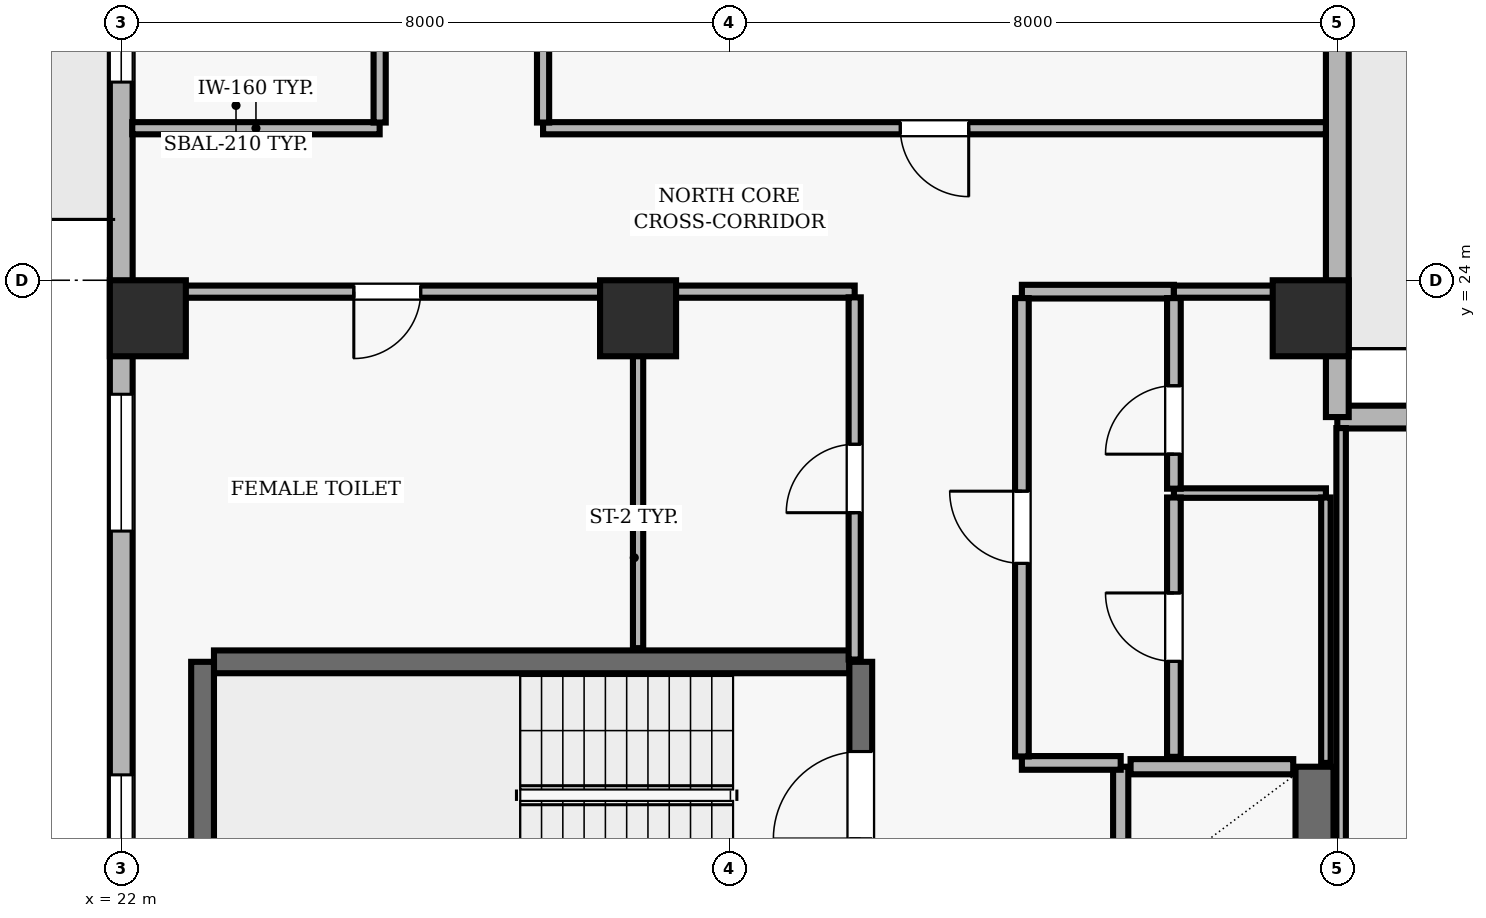
"""IFC4 building model, lengths in metres.
Left out: names, types, materials, properties, quantities, classifications, styles, units other than length and angle.
Written with IfcOpenShell. Run it as: python <this file> out.ifc"""

import sys

from ifc_helpers import new_model, si_unit, direction, frame, frame_2d, origin, origin_2d, place, context, subcontext, project, spatial, rectangle, extrude, element, fill, save


model = new_model("IFC4")
c1 = context("Model", 3, precision=1e-05, world=origin(), true_north=direction((0.0, 1.0)))
c2 = subcontext(c1, "Body", "Model", "MODEL_VIEW")
j1 = project(units=[si_unit("LENGTHUNIT", "METRE"), si_unit("PLANEANGLEUNIT", "RADIAN")], contexts=[c1])
p1 = place(None, origin())
s1 = spatial("IfcSite", under=j1, at=p1, CompositionType="ELEMENT")
p2 = place(p1, origin())
s2 = spatial("IfcBuilding", under=s1, at=p2, CompositionType="ELEMENT")
p3 = place(p2, frame((0.0, 0.0, 234.3)))
s3 = spatial("IfcBuildingStorey", under=s2, at=p3, CompositionType="ELEMENT", Elevation=234.3)
for number, where, z_axis, x_axis in (
    (1, (22.35, 23.5, 0.0), (0.0, 0.0, 1.0), (1.0, 0.0, 0.0)),
    (2, (28.8, 23.5, 0.0), (0.0, 0.0, 1.0), (1.0, 0.0, 0.0)),
    (3, (37.65, 23.5, 0.0), (0.0, 0.0, 1.0), (1.0, 0.0, 0.0)),
):
    element("IfcColumn", number, at=place(p3, frame(where, z_axis=z_axis, x_axis=x_axis)), inside=s3, PredefinedType="COLUMN", context=c2, shape_type="SweptSolid", body=[
        extrude(rectangle(XDim=1.0, YDim=1.0, at=origin_2d()), origin(), (0.0, 0.0, 1.0), 3.9),
    ])
p4 = place(p3, frame((42.4, 22.2, 0.0), z_axis=(0.0, 0.0, 1.0), x_axis=(-1.0, 0.0, 0.0)))
e4 = element("IfcWall", 4, at=p4, inside=s3, PredefinedType="SOLIDWALL", context=c2, shape_type="SweptSolid", body=[
    extrude(rectangle(XDim=4.4, YDim=0.3, at=frame_2d((2.2, 0.0))), origin(), (0.0, 0.0, 1.0), 3.64),
])
p5 = place(p3, frame((38.0, 22.2, 0.0), z_axis=(0.0, 0.0, 1.0), x_axis=(0.0, 1.0, 0.0)))
e5 = element("IfcWall", 5, at=p5, inside=s3, PredefinedType="SOLIDWALL", context=c2, shape_type="SweptSolid", body=[
    extrude(rectangle(XDim=18.5, YDim=0.3, at=frame_2d((9.25, 0.0))), origin(), (0.0, 0.0, 1.0), 3.64),
])
p6 = place(p5, frame((11.05, 0.0, 0.0)))
e6 = element("IfcOpeningElement", 6, at=p6, cuts=e5, PredefinedType="OPENING", context=c2, shape_type="SweptSolid", body=[
    extrude(rectangle(XDim=1.0, YDim=2.2, at=frame_2d((0.5, 1.1))), frame((0.0, 0.16, 0.0), z_axis=(0.0, -1.0, 0.0), x_axis=(1.0, 0.0, 0.0)), (0.0, 0.0, 1.0), 0.32),
])
p7 = place(p3, frame((22.0, 40.7, 0.0), z_axis=(0.0, 0.0, 1.0), x_axis=(0.0, -1.0, 0.0)))
e7 = element("IfcWall", 7, at=p7, inside=s3, PredefinedType="SOLIDWALL", context=c2, shape_type="SweptSolid", body=[
    extrude(rectangle(XDim=38.2, YDim=0.3, at=frame_2d((19.1, 0.0))), origin(), (0.0, 0.0, 1.0), 3.64),
])
p8 = place(p7, frame((6.7, 0.0, 0.0)))
e8 = element("IfcOpeningElement", 8, at=p8, cuts=e7, PredefinedType="OPENING", context=c2, shape_type="SweptSolid", body=[
    extrude(rectangle(XDim=1.0, YDim=2.2, at=frame_2d((0.5, 1.1))), frame((0.0, 0.16, 0.0), z_axis=(0.0, -1.0, 0.0), x_axis=(1.0, 0.0, 0.0)), (0.0, 0.0, 1.0), 0.32),
])
p9 = place(p7, frame((12.293, 0.0, 0.9)))
e9 = element("IfcOpeningElement", 9, at=p9, cuts=e7, PredefinedType="OPENING", context=c2, shape_type="SweptSolid", body=[
    extrude(rectangle(XDim=1.8, YDim=2.2, at=frame_2d((0.9, 1.1))), frame((0.0, 0.16, 0.0), z_axis=(0.0, -1.0, 0.0), x_axis=(1.0, 0.0, 0.0)), (0.0, 0.0, 1.0), 0.32),
])
p10 = place(p7, frame((18.2, 0.0, 0.9)))
e10 = element("IfcOpeningElement", 10, at=p10, cuts=e7, PredefinedType="OPENING", context=c2, shape_type="SweptSolid", body=[
    extrude(rectangle(XDim=1.8, YDim=2.2, at=frame_2d((0.9, 1.1))), frame((0.0, 0.16, 0.0), z_axis=(0.0, -1.0, 0.0), x_axis=(1.0, 0.0, 0.0)), (0.0, 0.0, 1.0), 0.32),
])
p11 = place(p7, frame((23.207, 0.0, 0.9)))
e11 = element("IfcOpeningElement", 11, at=p11, cuts=e7, PredefinedType="OPENING", context=c2, shape_type="SweptSolid", body=[
    extrude(rectangle(XDim=1.8, YDim=2.2, at=frame_2d((0.9, 1.1))), frame((0.0, 0.16, 0.0), z_axis=(0.0, -1.0, 0.0), x_axis=(1.0, 0.0, 0.0)), (0.0, 0.0, 1.0), 0.32),
])
p12 = place(p7, frame((29.114, 0.0, 0.9)))
e12 = element("IfcOpeningElement", 12, at=p12, cuts=e7, PredefinedType="OPENING", context=c2, shape_type="SweptSolid", body=[
    extrude(rectangle(XDim=1.8, YDim=2.2, at=frame_2d((0.9, 1.1))), frame((0.0, 0.16, 0.0), z_axis=(0.0, -1.0, 0.0), x_axis=(1.0, 0.0, 0.0)), (0.0, 0.0, 1.0), 0.32),
])
p13 = place(p3, frame((31.58, 18.98, 0.0), z_axis=(0.0, 0.0, 1.0), x_axis=(-1.0, 0.0, 0.0)))
e13 = element("IfcWall", 13, at=p13, inside=s3, PredefinedType="SHEAR", context=c2, shape_type="SweptSolid", body=[
    extrude(rectangle(XDim=8.36, YDim=0.3, at=frame_2d((4.18, 0.0))), origin(), (0.0, 0.0, 1.0), 3.64),
])
p14 = place(p3, frame((23.07, 18.98, 0.0), z_axis=(0.0, 0.0, 1.0), x_axis=(0.0, -1.0, 0.0)))
e14 = element("IfcWall", 14, at=p14, inside=s3, PredefinedType="SHEAR", context=c2, shape_type="SweptSolid", body=[
    extrude(rectangle(XDim=3.51, YDim=0.3, at=frame_2d((1.755, 0.0))), origin(), (0.0, 0.0, 1.0), 3.64),
])
p15 = place(p3, frame((31.73, 15.47, 0.0), z_axis=(0.0, 0.0, 1.0), x_axis=(0.0, 1.0, 0.0)))
e15 = element("IfcWall", 15, at=p15, inside=s3, PredefinedType="SHEAR", context=c2, shape_type="SweptSolid", body=[
    extrude(rectangle(XDim=3.51, YDim=0.3, at=frame_2d((1.755, 0.0))), origin(), (0.0, 0.0, 1.0), 3.64),
])
p16 = place(p15, frame((1.18, 0.0, 0.0)))
e16 = element("IfcOpeningElement", 16, at=p16, cuts=e15, PredefinedType="OPENING", context=c2, shape_type="SweptSolid", body=[
    extrude(rectangle(XDim=1.15, YDim=2.15, at=frame_2d((0.575, 1.075))), frame((0.0, 0.16, 0.0), z_axis=(0.0, -1.0, 0.0), x_axis=(1.0, 0.0, 0.0)), (0.0, 0.0, 1.0), 0.32),
])
p17 = place(p3, frame((35.15, 17.6, 0.0), z_axis=(0.0, 0.0, 1.0), x_axis=(0.0, -1.0, 0.0)))
e17 = element("IfcWall", 17, at=p17, inside=s3, PredefinedType="SOLIDWALL", context=c2, shape_type="SweptSolid", body=[
    extrude(rectangle(XDim=1.85, YDim=0.2, at=frame_2d((0.925, 0.0))), origin(), (0.0, 0.0, 1.0), 3.64),
])
p18 = place(p3, frame((37.7, 15.75, 0.0), z_axis=(0.0, 0.0, 1.0), x_axis=(0.0, 1.0, 0.0)))
e18 = element("IfcWall", 18, at=p18, inside=s3, PredefinedType="SHEAR", context=c2, shape_type="SweptSolid", body=[
    extrude(rectangle(XDim=1.85, YDim=0.5, at=frame_2d((0.925, 0.0))), origin(), (0.0, 0.0, 1.0), 3.64),
])
p19 = place(p3, frame((37.42, 17.6, 0.0), z_axis=(0.0, 0.0, 1.0), x_axis=(-1.0, 0.0, 0.0)))
e19 = element("IfcWall", 19, at=p19, inside=s3, PredefinedType="SOLIDWALL", context=c2, shape_type="SweptSolid", body=[
    extrude(rectangle(XDim=2.14, YDim=0.2, at=frame_2d((1.07, 0.0))), origin(), (0.0, 0.0, 1.0), 3.64),
])
p20 = place(p3, frame((25.4, 26.0, 0.0), z_axis=(0.0, 0.0, 1.0), x_axis=(-1.0, 0.0, 0.0)))
e20 = element("IfcWall", 20, at=p20, inside=s3, PredefinedType="PARTITIONING", context=c2, shape_type="SweptSolid", body=[
    extrude(rectangle(XDim=3.255, YDim=0.16, at=frame_2d((1.627, 0.0))), origin(), (0.0, 0.0, 1.0), 3.64),
])
p21 = place(p3, frame((28.8, 23.85, 0.0), z_axis=(0.0, 0.0, 1.0), x_axis=(-1.0, 0.0, 0.0)))
e21 = element("IfcWall", 21, at=p21, inside=s3, PredefinedType="PARTITIONING", context=c2, shape_type="SweptSolid", body=[
    extrude(rectangle(XDim=6.6, YDim=0.16, at=frame_2d((3.3, 0.0))), origin(), (0.0, 0.0, 1.0), 3.096),
])
p22 = place(p21, frame((2.86, 0.0, 0.0)))
e22 = element("IfcOpeningElement", 22, at=p22, cuts=e21, PredefinedType="OPENING", context=c2, shape_type="SweptSolid", body=[
    extrude(rectangle(XDim=0.88, YDim=2.1, at=frame_2d((0.44, 1.05))), frame((0.0, 0.09, 0.0), z_axis=(0.0, -1.0, 0.0), x_axis=(1.0, 0.0, 0.0)), (0.0, 0.0, 1.0), 0.18),
])
p23 = place(p3, frame((31.65, 23.85, 0.0), z_axis=(0.0, 0.0, 1.0), x_axis=(-1.0, 0.0, 0.0)))
e23 = element("IfcWall", 23, at=p23, inside=s3, PredefinedType="PARTITIONING", context=c2, shape_type="SweptSolid", body=[
    extrude(rectangle(XDim=2.85, YDim=0.16, at=frame_2d((1.425, 0.0))), origin(), (0.0, 0.0, 1.0), 3.096),
])
p24 = place(p3, frame((33.85, 17.65, 0.0), z_axis=(0.0, 0.0, 1.0), x_axis=(1.0, 0.0, 0.0)))
e24 = element("IfcWall", 24, at=p24, inside=s3, PredefinedType="PARTITIONING", context=c2, shape_type="SweptSolid", body=[
    extrude(rectangle(XDim=1.3, YDim=0.18, at=frame_2d((0.65, 0.0))), origin(), (0.0, 0.0, 1.0), 3.64),
])
p25 = place(p3, frame((35.85, 21.2, 0.0), z_axis=(0.0, 0.0, 1.0), x_axis=(1.0, 0.0, 0.0)))
e25 = element("IfcWall", 25, at=p25, inside=s3, PredefinedType="PARTITIONING", context=c2, shape_type="SweptSolid", body=[
    extrude(rectangle(XDim=2.0, YDim=0.125, at=frame_2d((1.0, 0.0))), origin(), (0.0, 0.0, 1.0), 3.64),
])
p26 = place(p3, frame((35.85, 23.85, 0.0), z_axis=(0.0, 0.0, 1.0), x_axis=(-1.0, 0.0, 0.0)))
e26 = element("IfcWall", 26, at=p26, inside=s3, PredefinedType="PARTITIONING", context=c2, shape_type="SweptSolid", body=[
    extrude(rectangle(XDim=2.0, YDim=0.18, at=frame_2d((1.0, 0.0))), origin(), (0.0, 0.0, 1.0), 3.096),
])
p27 = place(p3, frame((37.85, 23.85, 0.0), z_axis=(0.0, 0.0, 1.0), x_axis=(-1.0, 0.0, 0.0)))
e27 = element("IfcWall", 27, at=p27, inside=s3, PredefinedType="PARTITIONING", context=c2, shape_type="SweptSolid", body=[
    extrude(rectangle(XDim=2.0, YDim=0.16, at=frame_2d((1.0, 0.0))), origin(), (0.0, 0.0, 1.0), 3.096),
])
p28 = place(p3, frame((37.85, 26.0, 0.0), z_axis=(0.0, 0.0, 1.0), x_axis=(-1.0, 0.0, 0.0)))
e28 = element("IfcWall", 28, at=p28, inside=s3, PredefinedType="PARTITIONING", context=c2, shape_type="SweptSolid", body=[
    extrude(rectangle(XDim=10.3, YDim=0.16, at=frame_2d((5.15, 0.0))), origin(), (0.0, 0.0, 1.0), 3.64),
])
p29 = place(p28, frame((4.7, 0.0, 0.0)))
e29 = element("IfcOpeningElement", 29, at=p29, cuts=e28, PredefinedType="OPENING", context=c2, shape_type="SweptSolid", body=[
    extrude(rectangle(XDim=0.9, YDim=2.1, at=frame_2d((0.45, 1.05))), frame((0.0, 0.09, 0.0), z_axis=(0.0, -1.0, 0.0), x_axis=(1.0, 0.0, 0.0)), (0.0, 0.0, 1.0), 0.18),
])
p30 = place(p3, frame((25.4, 31.622, 0.0), z_axis=(0.0, 0.0, 1.0), x_axis=(0.0, -1.0, 0.0)))
e30 = element("IfcWall", 30, at=p30, inside=s3, PredefinedType="PARTITIONING", context=c2, shape_type="SweptSolid", body=[
    extrude(rectangle(XDim=5.547, YDim=0.16, at=frame_2d((2.773, 0.0))), origin(), (0.0, 0.0, 1.0), 3.64),
])
p31 = place(p30, frame((2.324, 0.0, 0.0)))
e31 = element("IfcOpeningElement", 31, at=p31, cuts=e30, PredefinedType="OPENING", context=c2, shape_type="SweptSolid", body=[
    extrude(rectangle(XDim=0.9, YDim=2.1, at=frame_2d((0.45, 1.05))), frame((0.0, 0.09, 0.0), z_axis=(0.0, -1.0, 0.0), x_axis=(1.0, 0.0, 0.0)), (0.0, 0.0, 1.0), 0.18),
])
p32 = place(p3, frame((27.55, 26.075, 0.0), z_axis=(0.0, 0.0, 1.0), x_axis=(0.0, 1.0, 0.0)))
e32 = element("IfcWall", 32, at=p32, inside=s3, PredefinedType="PARTITIONING", context=c2, shape_type="SweptSolid", body=[
    extrude(rectangle(XDim=5.547, YDim=0.16, at=frame_2d((2.773, 0.0))), origin(), (0.0, 0.0, 1.0), 3.64),
])
p33 = place(p3, frame((28.8, 23.775, 0.0), z_axis=(0.0, 0.0, 1.0), x_axis=(0.0, -1.0, 0.0)))
e33 = element("IfcWall", 33, at=p33, inside=s3, PredefinedType="PARTITIONING", context=c2, shape_type="SweptSolid", body=[
    extrude(rectangle(XDim=4.615, YDim=0.135, at=frame_2d((2.308, 0.0))), origin(), (0.0, 0.0, 1.0), 3.64),
])
p34 = place(p3, frame((31.65, 19.01, 0.0), z_axis=(0.0, 0.0, 1.0), x_axis=(0.0, 1.0, 0.0)))
e34 = element("IfcWall", 34, at=p34, inside=s3, PredefinedType="PARTITIONING", context=c2, shape_type="SweptSolid", body=[
    extrude(rectangle(XDim=4.765, YDim=0.16, at=frame_2d((2.382, 0.0))), origin(), (0.0, 0.0, 1.0), 3.64),
])
p35 = place(p34, frame((1.932, 0.0, 0.0)))
e35 = element("IfcOpeningElement", 35, at=p35, cuts=e34, PredefinedType="OPENING", context=c2, shape_type="SweptSolid", body=[
    extrude(rectangle(XDim=0.9, YDim=2.1, at=frame_2d((0.45, 1.05))), frame((0.0, 0.09, 0.0), z_axis=(0.0, -1.0, 0.0), x_axis=(1.0, 0.0, 0.0)), (0.0, 0.0, 1.0), 0.18),
])
p36 = place(p3, frame((33.85, 17.735, 0.0), z_axis=(0.0, 0.0, 1.0), x_axis=(0.0, 1.0, 0.0)))
e36 = element("IfcWall", 36, at=p36, inside=s3, PredefinedType="PARTITIONING", context=c2, shape_type="SweptSolid", body=[
    extrude(rectangle(XDim=6.03, YDim=0.18, at=frame_2d((3.015, 0.0))), origin(), (0.0, 0.0, 1.0), 3.64),
])
p37 = place(p36, frame((2.54, 0.0, 0.0)))
e37 = element("IfcOpeningElement", 37, at=p37, cuts=e36, PredefinedType="OPENING", context=c2, shape_type="SweptSolid", body=[
    extrude(rectangle(XDim=0.95, YDim=2.1, at=frame_2d((0.475, 1.05))), frame((0.0, 0.1, 0.0), z_axis=(0.0, -1.0, 0.0), x_axis=(1.0, 0.0, 0.0)), (0.0, 0.0, 1.0), 0.2),
])
p38 = place(p3, frame((35.85, 17.73, 0.0), z_axis=(0.0, 0.0, 1.0), x_axis=(0.0, 1.0, 0.0)))
e38 = element("IfcWall", 38, at=p38, inside=s3, PredefinedType="PARTITIONING", context=c2, shape_type="SweptSolid", body=[
    extrude(rectangle(XDim=3.412, YDim=0.18, at=frame_2d((1.706, 0.0))), origin(), (0.0, 0.0, 1.0), 3.64),
])
p39 = place(p38, frame((1.256, 0.0, 0.0)))
e39 = element("IfcOpeningElement", 39, at=p39, cuts=e38, PredefinedType="OPENING", context=c2, shape_type="SweptSolid", body=[
    extrude(rectangle(XDim=0.9, YDim=2.1, at=frame_2d((0.45, 1.05))), frame((0.0, 0.1, 0.0), z_axis=(0.0, -1.0, 0.0), x_axis=(1.0, 0.0, 0.0)), (0.0, 0.0, 1.0), 0.2),
])
p40 = place(p3, frame((35.85, 21.258, 0.0), z_axis=(0.0, 0.0, 1.0), x_axis=(0.0, 1.0, 0.0)))
e40 = element("IfcWall", 40, at=p40, inside=s3, PredefinedType="PARTITIONING", context=c2, shape_type="SweptSolid", body=[
    extrude(rectangle(XDim=2.507, YDim=0.18, at=frame_2d((1.253, 0.0))), origin(), (0.0, 0.0, 1.0), 3.64),
])
p41 = place(p40, frame((0.454, 0.0, 0.0)))
e41 = element("IfcOpeningElement", 41, at=p41, cuts=e40, PredefinedType="OPENING", context=c2, shape_type="SweptSolid", body=[
    extrude(rectangle(XDim=0.9, YDim=2.1, at=frame_2d((0.45, 1.05))), frame((0.0, 0.1, 0.0), z_axis=(0.0, -1.0, 0.0), x_axis=(1.0, 0.0, 0.0)), (0.0, 0.0, 1.0), 0.2),
])
p42 = place(p3, frame((37.85, 17.65, 0.0), z_axis=(0.0, 0.0, 1.0), x_axis=(0.0, 1.0, 0.0)))
e42 = element("IfcWall", 42, at=p42, inside=s3, PredefinedType="PARTITIONING", context=c2, shape_type="SweptSolid", body=[
    extrude(rectangle(XDim=3.492, YDim=0.125, at=frame_2d((1.746, 0.0))), origin(), (0.0, 0.0, 1.0), 3.096),
])
p43 = place(p3, frame((38.05, 22.055, 0.0), z_axis=(0.0, 0.0, 1.0), x_axis=(0.0, -1.0, 0.0)))
e43 = element("IfcWall", 43, at=p43, inside=s3, PredefinedType="PARTITIONING", context=c2, shape_type="SweptSolid", body=[
    extrude(rectangle(XDim=5.98, YDim=0.125, at=frame_2d((2.99, 0.0))), origin(), (0.0, 0.0, 1.0), 3.096),
])
p44 = place(p9, origin())
e44 = element("IfcWindow", 44, at=p44, inside=s3, PartitioningType="SINGLE_PANEL", PredefinedType="WINDOW", context=c2, shape_type="SweptSolid", body=[
    extrude(rectangle(XDim=1.8, YDim=2.2, at=frame_2d((0.9, 1.1))), frame((0.0, 0.03, 0.0), z_axis=(0.0, -1.0, 0.0), x_axis=(1.0, 0.0, 0.0)), (0.0, 0.0, 1.0), 0.06),
])
fill(e9, e44)
p45 = place(p10, origin())
e45 = element("IfcWindow", 45, at=p45, inside=s3, PartitioningType="SINGLE_PANEL", PredefinedType="WINDOW", context=c2, shape_type="SweptSolid", body=[
    extrude(rectangle(XDim=1.8, YDim=2.2, at=frame_2d((0.9, 1.1))), frame((0.0, 0.03, 0.0), z_axis=(0.0, -1.0, 0.0), x_axis=(1.0, 0.0, 0.0)), (0.0, 0.0, 1.0), 0.06),
])
fill(e10, e45)
p46 = place(p11, origin())
e46 = element("IfcWindow", 46, at=p46, inside=s3, PartitioningType="SINGLE_PANEL", PredefinedType="WINDOW", context=c2, shape_type="SweptSolid", body=[
    extrude(rectangle(XDim=1.8, YDim=2.2, at=frame_2d((0.9, 1.1))), frame((0.0, 0.03, 0.0), z_axis=(0.0, -1.0, 0.0), x_axis=(1.0, 0.0, 0.0)), (0.0, 0.0, 1.0), 0.06),
])
fill(e11, e46)
p47 = place(p16, origin())
e47 = element("IfcDoor", 47, at=p47, inside=s3, OperationType="SINGLE_SWING_LEFT", PredefinedType="DOOR", context=c2, shape_type="SweptSolid", body=[
    extrude(rectangle(XDim=1.15, YDim=2.15, at=frame_2d((0.575, 1.075))), frame((0.0, 0.025, 0.0), z_axis=(0.0, -1.0, 0.0), x_axis=(1.0, 0.0, 0.0)), (0.0, 0.0, 1.0), 0.05),
])
fill(e16, e47)
p48 = place(p37, origin())
e48 = element("IfcDoor", 48, at=p48, inside=s3, OperationType="SINGLE_SWING_RIGHT", PredefinedType="DOOR", context=c2, shape_type="SweptSolid", body=[
    extrude(rectangle(XDim=0.95, YDim=2.1, at=frame_2d((0.475, 1.05))), frame((0.0, 0.025, 0.0), z_axis=(0.0, -1.0, 0.0), x_axis=(1.0, 0.0, 0.0)), (0.0, 0.0, 1.0), 0.05),
])
fill(e37, e48)
p49 = place(p41, origin())
e49 = element("IfcDoor", 49, at=p49, inside=s3, OperationType="SINGLE_SWING_LEFT", PredefinedType="DOOR", context=c2, shape_type="SweptSolid", body=[
    extrude(rectangle(XDim=0.9, YDim=2.1, at=frame_2d((0.45, 1.05))), frame((0.0, 0.025, 0.0), z_axis=(0.0, -1.0, 0.0), x_axis=(1.0, 0.0, 0.0)), (0.0, 0.0, 1.0), 0.05),
])
fill(e41, e49)
p50 = place(p39, origin())
e50 = element("IfcDoor", 50, at=p50, inside=s3, OperationType="SINGLE_SWING_RIGHT", PredefinedType="DOOR", context=c2, shape_type="SweptSolid", body=[
    extrude(rectangle(XDim=0.9, YDim=2.1, at=frame_2d((0.45, 1.05))), frame((0.0, 0.025, 0.0), z_axis=(0.0, -1.0, 0.0), x_axis=(1.0, 0.0, 0.0)), (0.0, 0.0, 1.0), 0.05),
])
fill(e39, e50)
p51 = place(p35, origin())
e51 = element("IfcDoor", 51, at=p51, inside=s3, OperationType="SINGLE_SWING_LEFT", PredefinedType="DOOR", context=c2, shape_type="SweptSolid", body=[
    extrude(rectangle(XDim=0.9, YDim=2.1, at=frame_2d((0.45, 1.05))), frame((0.0, 0.025, 0.0), z_axis=(0.0, -1.0, 0.0), x_axis=(1.0, 0.0, 0.0)), (0.0, 0.0, 1.0), 0.05),
])
fill(e35, e51)
p52 = place(p22, origin())
e52 = element("IfcDoor", 52, at=p52, inside=s3, OperationType="SINGLE_SWING_RIGHT", PredefinedType="DOOR", context=c2, shape_type="SweptSolid", body=[
    extrude(rectangle(XDim=0.88, YDim=2.1, at=frame_2d((0.44, 1.05))), frame((0.0, 0.025, 0.0), z_axis=(0.0, -1.0, 0.0), x_axis=(1.0, 0.0, 0.0)), (0.0, 0.0, 1.0), 0.05),
])
fill(e22, e52)
p53 = place(p29, origin())
e53 = element("IfcDoor", 53, at=p53, inside=s3, OperationType="SINGLE_SWING_LEFT", PredefinedType="DOOR", context=c2, shape_type="SweptSolid", body=[
    extrude(rectangle(XDim=0.9, YDim=2.1, at=frame_2d((0.45, 1.05))), frame((0.0, 0.025, 0.0), z_axis=(0.0, -1.0, 0.0), x_axis=(1.0, 0.0, 0.0)), (0.0, 0.0, 1.0), 0.05),
])
fill(e29, e53)
save(model, sys.argv[1])
